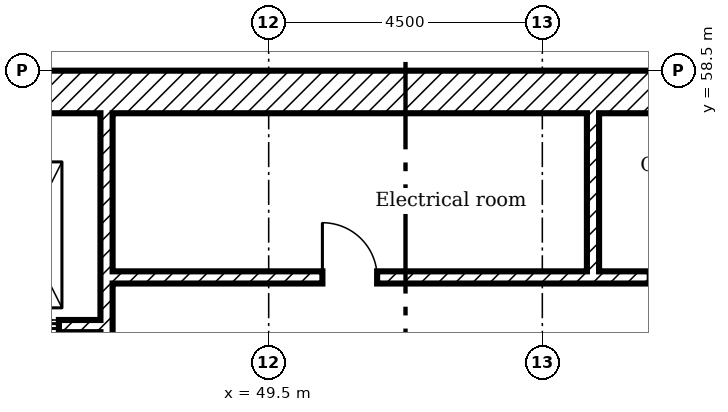
"""IFC4 building model, lengths in metres.
Left out: names, types, materials, properties, quantities, classifications, styles, units other than length and angle.
Written with IfcOpenShell. Run it as: python <this file> out.ifc"""

import sys

from ifc_helpers import new_model, si_unit, direction, frame, frame_2d, origin, place, context, subcontext, project, spatial, rectangle, extrude, element, fill, save


model = new_model("IFC4")
c1 = context("Model", 3, precision=1e-05, world=origin(), true_north=direction((0.0, 1.0)))
c2 = subcontext(c1, "Body", "Model", "MODEL_VIEW")
j1 = project(units=[si_unit("LENGTHUNIT", "METRE"), si_unit("PLANEANGLEUNIT", "RADIAN")], contexts=[c1])
p1 = place(None, origin())
s1 = spatial("IfcSite", under=j1, at=p1, CompositionType="ELEMENT")
p2 = place(p1, origin())
s2 = spatial("IfcBuilding", under=s1, at=p2, CompositionType="ELEMENT")
p3 = place(p2, frame((0.0, 0.0, 95.6)))
s3 = spatial("IfcBuildingStorey", under=s2, at=p3, CompositionType="ELEMENT", Elevation=95.6)
p4 = place(p3, frame((41.2, 58.15, 0.0)))
e1 = element("IfcWall", 1, at=p4, inside=s3, PredefinedType="SHEAR", context=c2, shape_type="SweptSolid", body=[
    extrude(rectangle(XDim=16.6, YDim=0.7, at=frame_2d((8.3, 0.0))), origin(), (0.0, 0.0, 1.0), 3.35),
])
p5 = place(p3, frame((46.833, 57.8, 0.0), z_axis=(0.0, 0.0, 1.0), x_axis=(0.0, -1.0, 0.0)))
e2 = element("IfcWall", 2, at=p5, inside=s3, PredefinedType="SHEAR", context=c2, shape_type="SweptSolid", body=[
    extrude(rectangle(XDim=4.5, YDim=0.2, at=frame_2d((2.25, 0.0))), origin(), (0.0, 0.0, 1.0), 3.35),
])
p6 = place(p3, frame((54.833, 57.8, 0.0), z_axis=(0.0, 0.0, 1.0), x_axis=(0.0, -1.0, 0.0)))
e3 = element("IfcWall", 3, at=p6, inside=s3, PredefinedType="SHEAR", context=c2, shape_type="SweptSolid", body=[
    extrude(rectangle(XDim=2.6, YDim=0.2, at=frame_2d((1.3, 0.0))), origin(), (0.0, 0.0, 1.0), 3.35),
])
p7 = place(p3, frame((46.933, 55.1, 0.0)))
e4 = element("IfcWall", 4, at=p7, inside=s3, PredefinedType="SHEAR", context=c2, shape_type="SweptSolid", body=[
    extrude(rectangle(XDim=10.867, YDim=0.2, at=frame_2d((5.433, 0.0))), origin(), (0.0, 0.0, 1.0), 3.35),
])
p8 = place(p7, frame((8.833, 0.0, 0.0)))
e5 = element("IfcOpeningElement", 5, at=p8, cuts=e4, PredefinedType="OPENING", context=c2, shape_type="SweptSolid", body=[
    extrude(rectangle(XDim=0.9, YDim=2.1, at=frame_2d((0.45, 1.05))), frame((0.0, 0.11, 0.0), z_axis=(0.0, -1.0, 0.0), x_axis=(1.0, 0.0, 0.0)), (0.0, 0.0, 1.0), 0.22),
])
p9 = place(p7, frame((3.45, 0.0, 0.0)))
e6 = element("IfcOpeningElement", 6, at=p9, cuts=e4, PredefinedType="OPENING", context=c2, shape_type="SweptSolid", body=[
    extrude(rectangle(XDim=0.9, YDim=2.1, at=frame_2d((0.45, 1.05))), frame((0.0, 0.11, 0.0), z_axis=(0.0, -1.0, 0.0), x_axis=(1.0, 0.0, 0.0)), (0.0, 0.0, 1.0), 0.22),
])
p10 = place(p3, frame((41.2, 54.3, 0.0)))
e7 = element("IfcWall", 7, at=p10, inside=s3, PredefinedType="SHEAR", context=c2, shape_type="SweptSolid", body=[
    extrude(rectangle(XDim=5.533, YDim=0.2, at=frame_2d((2.767, 0.0))), origin(), (0.0, 0.0, 1.0), 3.35),
])
p11 = place(p10, frame((1.083, 0.0, 0.0)))
e8 = element("IfcOpeningElement", 8, at=p11, cuts=e7, PredefinedType="OPENING", context=c2, shape_type="SweptSolid", body=[
    extrude(rectangle(XDim=1.1, YDim=2.1, at=frame_2d((0.55, 1.05))), frame((0.0, 0.11, 0.0), z_axis=(0.0, -1.0, 0.0), x_axis=(1.0, 0.0, 0.0)), (0.0, 0.0, 1.0), 0.22),
])
p12 = place(p10, frame((3.75, 0.0, 0.0)))
e9 = element("IfcOpeningElement", 9, at=p12, cuts=e7, PredefinedType="OPENING", context=c2, shape_type="SweptSolid", body=[
    extrude(rectangle(XDim=1.1, YDim=2.1, at=frame_2d((0.55, 1.05))), frame((0.0, 0.11, 0.0), z_axis=(0.0, -1.0, 0.0), x_axis=(1.0, 0.0, 0.0)), (0.0, 0.0, 1.0), 0.22),
])
p13 = place(p9, origin())
e10 = element("IfcDoor", 10, at=p13, inside=s3, OperationType="SINGLE_SWING_RIGHT", PredefinedType="DOOR", context=c2, shape_type="SweptSolid", body=[
    extrude(rectangle(XDim=0.9, YDim=2.1, at=frame_2d((0.45, 1.05))), frame((0.0, 0.025, 0.0), z_axis=(0.0, -1.0, 0.0), x_axis=(1.0, 0.0, 0.0)), (0.0, 0.0, 1.0), 0.05),
])
fill(e6, e10)
p14 = place(p12, origin())
e11 = element("IfcDoor", 11, at=p14, inside=s3, OperationType="SLIDING_TO_LEFT", PredefinedType="DOOR", context=c2, shape_type="SweptSolid", body=[
    extrude(rectangle(XDim=1.1, YDim=2.1, at=frame_2d((0.55, 1.05))), frame((0.0, 0.025, 0.0), z_axis=(0.0, -1.0, 0.0), x_axis=(1.0, 0.0, 0.0)), (0.0, 0.0, 1.0), 0.05),
])
fill(e9, e11)
save(model, sys.argv[1])
